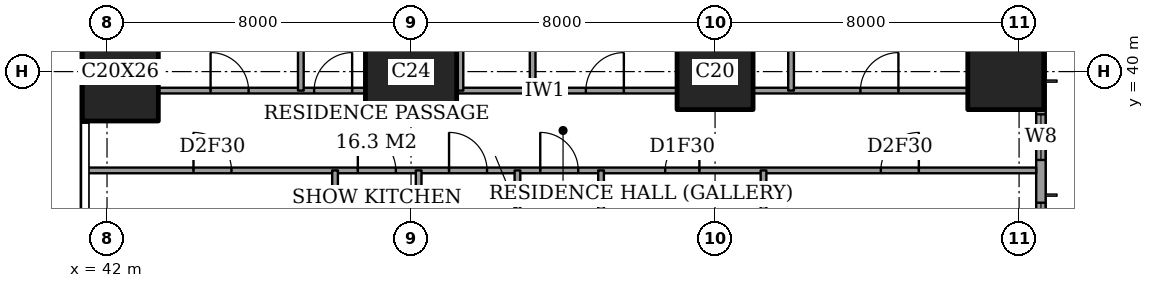
"""IFC4 building model, lengths in metres.
Left out: names, types, materials, properties, quantities, classifications, styles, units other than length and angle.
Written with IfcOpenShell. Run it as: python <this file> out.ifc"""

import sys

from ifc_helpers import new_model, si_unit, direction, frame, frame_2d, origin, origin_2d, place, context, subcontext, project, spatial, rectangle, extrude, element, fill, save


model = new_model("IFC4")
c1 = context("Model", 3, precision=1e-05, world=origin(), true_north=direction((0.0, 1.0)))
c2 = subcontext(c1, "Body", "Model", "MODEL_VIEW")
j1 = project(units=[si_unit("LENGTHUNIT", "METRE"), si_unit("PLANEANGLEUNIT", "RADIAN")], contexts=[c1])
p1 = place(None, origin())
s1 = spatial("IfcSite", under=j1, at=p1, CompositionType="ELEMENT")
p2 = place(p1, origin())
s2 = spatial("IfcBuilding", under=s1, at=p2, CompositionType="ELEMENT")
p3 = place(p2, frame((0.0, 0.0, 33.2)))
s3 = spatial("IfcBuildingStorey", under=s2, at=p3, CompositionType="ELEMENT", Elevation=33.2)
p4 = place(p3, frame((42.35, 40.0, 0.0), z_axis=(0.0, 0.0, 1.0), x_axis=(1.0, 0.0, 0.0)))
e1 = element("IfcColumn", 1, at=p4, inside=s3, PredefinedType="COLUMN", context=c2, shape_type="SweptSolid", body=[
    extrude(rectangle(XDim=2.0, YDim=2.6, at=origin_2d()), origin(), (0.0, 0.0, 1.0), 3.6),
])
p5 = place(p3, frame((50.0, 40.0, 0.0), z_axis=(0.0, 0.0, 1.0), x_axis=(1.0, 0.0, 0.0)))
e2 = element("IfcColumn", 2, at=p5, inside=s3, PredefinedType="COLUMN", context=c2, shape_type="SweptSolid", body=[
    extrude(rectangle(XDim=2.4, YDim=2.4, at=origin_2d()), origin(), (0.0, 0.0, 1.0), 3.6),
])
for number, where, z_axis, x_axis in (
    (3, (58.0, 40.0, 0.0), (0.0, 0.0, 1.0), (1.0, 0.0, 0.0)),
    (4, (65.65, 40.0, 0.0), (0.0, 0.0, 1.0), (1.0, 0.0, 0.0)),
):
    element("IfcColumn", number, at=place(p3, frame(where, z_axis=z_axis, x_axis=x_axis)), inside=s3, PredefinedType="COLUMN", context=c2, shape_type="SweptSolid", body=[
        extrude(rectangle(XDim=2.0, YDim=2.0, at=origin_2d()), origin(), (0.0, 0.0, 1.0), 3.6),
    ])
p6 = place(p3, frame((66.575, 3.175, 0.0), z_axis=(0.0, 0.0, 1.0), x_axis=(0.0, 1.0, 0.0)))
e5 = element("IfcWall", 5, at=p6, inside=s3, PredefinedType="SOLIDWALL", context=c2, shape_type="SweptSolid", body=[
    extrude(rectangle(XDim=41.65, YDim=0.25, at=frame_2d((20.825, 0.0))), origin(), (0.0, 0.0, 1.0), 3.6),
])
p7 = place(p6, frame((0.775, 0.0, 0.6)))
e6 = element("IfcOpeningElement", 6, at=p7, cuts=e5, PredefinedType="OPENING", context=c2, shape_type="SweptSolid", body=[
    extrude(rectangle(XDim=2.4, YDim=2.0, at=frame_2d((1.2, 1.0))), frame((0.0, 0.135, 0.0), z_axis=(0.0, -1.0, 0.0), x_axis=(1.0, 0.0, 0.0)), (0.0, 0.0, 1.0), 0.27),
])
p8 = place(p6, frame((6.1, 0.0, 0.6)))
e7 = element("IfcOpeningElement", 7, at=p8, cuts=e5, PredefinedType="OPENING", context=c2, shape_type="SweptSolid", body=[
    extrude(rectangle(XDim=1.2, YDim=2.0, at=frame_2d((0.6, 1.0))), frame((0.0, 0.135, 0.0), z_axis=(0.0, -1.0, 0.0), x_axis=(1.0, 0.0, 0.0)), (0.0, 0.0, 1.0), 0.27),
])
p9 = place(p6, frame((8.275, 0.0, 0.6)))
e8 = element("IfcOpeningElement", 8, at=p9, cuts=e5, PredefinedType="OPENING", context=c2, shape_type="SweptSolid", body=[
    extrude(rectangle(XDim=2.4, YDim=2.0, at=frame_2d((1.2, 1.0))), frame((0.0, 0.135, 0.0), z_axis=(0.0, -1.0, 0.0), x_axis=(1.0, 0.0, 0.0)), (0.0, 0.0, 1.0), 0.27),
])
p10 = place(p6, frame((15.775, 0.0, 0.6)))
e9 = element("IfcOpeningElement", 9, at=p10, cuts=e5, PredefinedType="OPENING", context=c2, shape_type="SweptSolid", body=[
    extrude(rectangle(XDim=2.4, YDim=2.0, at=frame_2d((1.2, 1.0))), frame((0.0, 0.135, 0.0), z_axis=(0.0, -1.0, 0.0), x_axis=(1.0, 0.0, 0.0)), (0.0, 0.0, 1.0), 0.27),
])
p11 = place(p6, frame((23.475, 0.0, 0.6)))
e10 = element("IfcOpeningElement", 10, at=p11, cuts=e5, PredefinedType="OPENING", context=c2, shape_type="SweptSolid", body=[
    extrude(rectangle(XDim=2.4, YDim=2.0, at=frame_2d((1.2, 1.0))), frame((0.0, 0.135, 0.0), z_axis=(0.0, -1.0, 0.0), x_axis=(1.0, 0.0, 0.0)), (0.0, 0.0, 1.0), 0.27),
])
p12 = place(p6, frame((30.975, 0.0, 0.6)))
e11 = element("IfcOpeningElement", 11, at=p12, cuts=e5, PredefinedType="OPENING", context=c2, shape_type="SweptSolid", body=[
    extrude(rectangle(XDim=2.4, YDim=2.0, at=frame_2d((1.2, 1.0))), frame((0.0, 0.135, 0.0), z_axis=(0.0, -1.0, 0.0), x_axis=(1.0, 0.0, 0.0)), (0.0, 0.0, 1.0), 0.27),
])
p13 = place(p6, frame((34.5, 0.0, 0.6)))
e12 = element("IfcOpeningElement", 12, at=p13, cuts=e5, PredefinedType="OPENING", context=c2, shape_type="SweptSolid", body=[
    extrude(rectangle(XDim=1.2, YDim=2.0, at=frame_2d((0.6, 1.0))), frame((0.0, 0.135, 0.0), z_axis=(0.0, -1.0, 0.0), x_axis=(1.0, 0.0, 0.0)), (0.0, 0.0, 1.0), 0.27),
])
p14 = place(p6, frame((38.475, 0.0, 0.6)))
e13 = element("IfcOpeningElement", 13, at=p14, cuts=e5, PredefinedType="OPENING", context=c2, shape_type="SweptSolid", body=[
    extrude(rectangle(XDim=2.4, YDim=2.0, at=frame_2d((1.2, 1.0))), frame((0.0, 0.135, 0.0), z_axis=(0.0, -1.0, 0.0), x_axis=(1.0, 0.0, 0.0)), (0.0, 0.0, 1.0), 0.27),
])
p15 = place(p3, frame((41.439, 37.4, 0.0), z_axis=(0.0, 0.0, 1.0), x_axis=(1.0, 0.0, 0.0)))
e14 = element("IfcWall", 14, at=p15, inside=s3, PredefinedType="PARTITIONING", context=c2, shape_type="SweptSolid", body=[
    extrude(rectangle(XDim=25.011, YDim=0.15, at=frame_2d((12.505, 0.0))), origin(), (0.0, 0.0, 1.0), 3.35),
])
p16 = place(p15, frame((11.961, 0.0, 0.0)))
e15 = element("IfcOpeningElement", 15, at=p16, cuts=e14, PredefinedType="OPENING", context=c2, shape_type="SweptSolid", body=[
    extrude(rectangle(XDim=1.0, YDim=2.1, at=frame_2d((0.5, 1.05))), frame((0.0, 0.085, 0.0), z_axis=(0.0, -1.0, 0.0), x_axis=(1.0, 0.0, 0.0)), (0.0, 0.0, 1.0), 0.17),
])
p17 = place(p15, frame((20.924, 0.0, 0.0)))
e16 = element("IfcOpeningElement", 16, at=p17, cuts=e14, PredefinedType="OPENING", context=c2, shape_type="SweptSolid", body=[
    extrude(rectangle(XDim=1.0, YDim=2.1, at=frame_2d((0.5, 1.05))), frame((0.0, 0.085, 0.0), z_axis=(0.0, -1.0, 0.0), x_axis=(1.0, 0.0, 0.0)), (0.0, 0.0, 1.0), 0.17),
])
p18 = place(p15, frame((15.249, 0.0, 0.0)))
e17 = element("IfcOpeningElement", 17, at=p18, cuts=e14, PredefinedType="OPENING", context=c2, shape_type="SweptSolid", body=[
    extrude(rectangle(XDim=0.9, YDim=2.1, at=frame_2d((0.45, 1.05))), frame((0.0, 0.085, 0.0), z_axis=(0.0, -1.0, 0.0), x_axis=(1.0, 0.0, 0.0)), (0.0, 0.0, 1.0), 0.17),
])
p19 = place(p15, frame((9.561, 0.0, 0.0)))
e18 = element("IfcOpeningElement", 18, at=p19, cuts=e14, PredefinedType="OPENING", context=c2, shape_type="SweptSolid", body=[
    extrude(rectangle(XDim=1.0, YDim=2.1, at=frame_2d((0.5, 1.05))), frame((0.0, 0.085, 0.0), z_axis=(0.0, -1.0, 0.0), x_axis=(1.0, 0.0, 0.0)), (0.0, 0.0, 1.0), 0.17),
])
p20 = place(p15, frame((7.161, 0.0, 0.0)))
e19 = element("IfcOpeningElement", 19, at=p20, cuts=e14, PredefinedType="OPENING", context=c2, shape_type="SweptSolid", body=[
    extrude(rectangle(XDim=1.0, YDim=2.1, at=frame_2d((0.5, 1.05))), frame((0.0, 0.085, 0.0), z_axis=(0.0, -1.0, 0.0), x_axis=(1.0, 0.0, 0.0)), (0.0, 0.0, 1.0), 0.17),
])
p21 = place(p15, frame((2.836, 0.0, 0.0)))
e20 = element("IfcOpeningElement", 20, at=p21, cuts=e14, PredefinedType="OPENING", context=c2, shape_type="SweptSolid", body=[
    extrude(rectangle(XDim=1.0, YDim=2.1, at=frame_2d((0.5, 1.05))), frame((0.0, 0.085, 0.0), z_axis=(0.0, -1.0, 0.0), x_axis=(1.0, 0.0, 0.0)), (0.0, 0.0, 1.0), 0.17),
])
p22 = place(p3, frame((43.35, 39.5, 0.0), z_axis=(0.0, 0.0, 1.0), x_axis=(1.0, 0.0, 0.0)))
e21 = element("IfcWall", 21, at=p22, inside=s3, PredefinedType="PARTITIONING", context=c2, shape_type="SweptSolid", body=[
    extrude(rectangle(XDim=5.45, YDim=0.15, at=frame_2d((2.725, 0.0))), origin(), (0.0, 0.0, 1.0), 3.35),
])
p23 = place(p22, frame((4.1, 0.0, 0.0)))
e22 = element("IfcOpeningElement", 22, at=p23, cuts=e21, PredefinedType="OPENING", context=c2, shape_type="SweptSolid", body=[
    extrude(rectangle(XDim=1.0, YDim=2.1, at=frame_2d((0.5, 1.05))), frame((0.0, 0.085, 0.0), z_axis=(0.0, -1.0, 0.0), x_axis=(1.0, 0.0, 0.0)), (0.0, 0.0, 1.0), 0.17),
])
p24 = place(p22, frame((1.375, 0.0, 0.0)))
e23 = element("IfcOpeningElement", 23, at=p24, cuts=e21, PredefinedType="OPENING", context=c2, shape_type="SweptSolid", body=[
    extrude(rectangle(XDim=1.0, YDim=2.1, at=frame_2d((0.5, 1.05))), frame((0.0, 0.085, 0.0), z_axis=(0.0, -1.0, 0.0), x_axis=(1.0, 0.0, 0.0)), (0.0, 0.0, 1.0), 0.17),
])
p25 = place(p3, frame((51.2, 39.5, 0.0), z_axis=(0.0, 0.0, 1.0), x_axis=(1.0, 0.0, 0.0)))
e24 = element("IfcWall", 24, at=p25, inside=s3, PredefinedType="PARTITIONING", context=c2, shape_type="SweptSolid", body=[
    extrude(rectangle(XDim=5.8, YDim=0.15, at=frame_2d((2.9, 0.0))), origin(), (0.0, 0.0, 1.0), 3.35),
])
p26 = place(p25, frame((3.4, 0.0, 0.0)))
e25 = element("IfcOpeningElement", 25, at=p26, cuts=e24, PredefinedType="OPENING", context=c2, shape_type="SweptSolid", body=[
    extrude(rectangle(XDim=1.0, YDim=2.1, at=frame_2d((0.5, 1.05))), frame((0.0, 0.085, 0.0), z_axis=(0.0, -1.0, 0.0), x_axis=(1.0, 0.0, 0.0)), (0.0, 0.0, 1.0), 0.17),
])
p27 = place(p3, frame((59.0, 39.5, 0.0), z_axis=(0.0, 0.0, 1.0), x_axis=(1.0, 0.0, 0.0)))
e26 = element("IfcWall", 26, at=p27, inside=s3, PredefinedType="PARTITIONING", context=c2, shape_type="SweptSolid", body=[
    extrude(rectangle(XDim=5.65, YDim=0.15, at=frame_2d((2.825, 0.0))), origin(), (0.0, 0.0, 1.0), 3.35),
])
p28 = place(p27, frame((2.825, 0.0, 0.0)))
e27 = element("IfcOpeningElement", 27, at=p28, cuts=e26, PredefinedType="OPENING", context=c2, shape_type="SweptSolid", body=[
    extrude(rectangle(XDim=1.0, YDim=2.1, at=frame_2d((0.5, 1.05))), frame((0.0, 0.085, 0.0), z_axis=(0.0, -1.0, 0.0), x_axis=(1.0, 0.0, 0.0)), (0.0, 0.0, 1.0), 0.17),
])
p29 = place(p3, frame((47.1, 39.5, 0.0), z_axis=(0.0, 0.0, 1.0), x_axis=(0.0, 1.0, 0.0)))
e28 = element("IfcWall", 28, at=p29, inside=s3, PredefinedType="PARTITIONING", context=c2, shape_type="SweptSolid", body=[
    extrude(rectangle(XDim=8.95, YDim=0.15, at=frame_2d((4.475, 0.0))), origin(), (0.0, 0.0, 1.0), 3.35),
])
p30 = place(p3, frame((48.0, 28.0, 0.0), z_axis=(0.0, 0.0, 1.0), x_axis=(0.0, 1.0, 0.0)))
e29 = element("IfcWall", 29, at=p30, inside=s3, PredefinedType="PARTITIONING", context=c2, shape_type="SweptSolid", body=[
    extrude(rectangle(XDim=9.4, YDim=0.15, at=frame_2d((4.7, 0.0))), origin(), (0.0, 0.0, 1.0), 3.35),
])
p31 = place(p30, frame((0.5, 0.0, 0.0)))
e30 = element("IfcOpeningElement", 30, at=p31, cuts=e29, PredefinedType="OPENING", context=c2, shape_type="SweptSolid", body=[
    extrude(rectangle(XDim=1.0, YDim=2.1, at=frame_2d((0.5, 1.05))), frame((0.0, 0.085, 0.0), z_axis=(0.0, -1.0, 0.0), x_axis=(1.0, 0.0, 0.0)), (0.0, 0.0, 1.0), 0.17),
])
p32 = place(p3, frame((50.2, 33.2, 0.0), z_axis=(0.0, 0.0, 1.0), x_axis=(0.0, 1.0, 0.0)))
e31 = element("IfcWall", 31, at=p32, inside=s3, PredefinedType="PARTITIONING", context=c2, shape_type="SweptSolid", body=[
    extrude(rectangle(XDim=4.2, YDim=0.15, at=frame_2d((2.1, 0.0))), origin(), (0.0, 0.0, 1.0), 3.35),
])
p33 = place(p3, frame((51.3, 39.5, 0.0), z_axis=(0.0, 0.0, 1.0), x_axis=(0.0, 1.0, 0.0)))
e32 = element("IfcWall", 32, at=p33, inside=s3, PredefinedType="PARTITIONING", context=c2, shape_type="SweptSolid", body=[
    extrude(rectangle(XDim=8.95, YDim=0.15, at=frame_2d((4.475, 0.0))), origin(), (0.0, 0.0, 1.0), 3.35),
])
p34 = place(p33, frame((4.025, 0.0, 0.0)))
e33 = element("IfcOpeningElement", 33, at=p34, cuts=e32, PredefinedType="OPENING", context=c2, shape_type="SweptSolid", body=[
    extrude(rectangle(XDim=0.9, YDim=2.1, at=frame_2d((0.45, 1.05))), frame((0.0, 0.085, 0.0), z_axis=(0.0, -1.0, 0.0), x_axis=(1.0, 0.0, 0.0)), (0.0, 0.0, 1.0), 0.17),
])
p35 = place(p3, frame((52.8, 30.0, 0.0), z_axis=(0.0, 0.0, 1.0), x_axis=(0.0, 1.0, 0.0)))
e34 = element("IfcWall", 34, at=p35, inside=s3, PredefinedType="PARTITIONING", context=c2, shape_type="SweptSolid", body=[
    extrude(rectangle(XDim=7.4, YDim=0.15, at=frame_2d((3.7, 0.0))), origin(), (0.0, 0.0, 1.0), 3.35),
])
p36 = place(p3, frame((53.2, 39.5, 0.0), z_axis=(0.0, 0.0, 1.0), x_axis=(0.0, 1.0, 0.0)))
e35 = element("IfcWall", 35, at=p36, inside=s3, PredefinedType="PARTITIONING", context=c2, shape_type="SweptSolid", body=[
    extrude(rectangle(XDim=8.95, YDim=0.15, at=frame_2d((4.475, 0.0))), origin(), (0.0, 0.0, 1.0), 3.35),
])
p37 = place(p3, frame((55.0, 28.0, 0.0), z_axis=(0.0, 0.0, 1.0), x_axis=(0.0, 1.0, 0.0)))
e36 = element("IfcWall", 36, at=p37, inside=s3, PredefinedType="PARTITIONING", context=c2, shape_type="SweptSolid", body=[
    extrude(rectangle(XDim=9.4, YDim=0.15, at=frame_2d((4.7, 0.0))), origin(), (0.0, 0.0, 1.0), 3.35),
])
p38 = place(p37, frame((0.5, 0.0, 0.0)))
e37 = element("IfcOpeningElement", 37, at=p38, cuts=e36, PredefinedType="OPENING", context=c2, shape_type="SweptSolid", body=[
    extrude(rectangle(XDim=1.0, YDim=2.1, at=frame_2d((0.5, 1.05))), frame((0.0, 0.085, 0.0), z_axis=(0.0, -1.0, 0.0), x_axis=(1.0, 0.0, 0.0)), (0.0, 0.0, 1.0), 0.17),
])
p39 = place(p3, frame((59.275, 33.2, 0.0), z_axis=(0.0, 0.0, 1.0), x_axis=(0.0, 1.0, 0.0)))
e38 = element("IfcWall", 38, at=p39, inside=s3, PredefinedType="PARTITIONING", context=c2, shape_type="SweptSolid", body=[
    extrude(rectangle(XDim=4.2, YDim=0.15, at=frame_2d((2.1, 0.0))), origin(), (0.0, 0.0, 1.0), 3.35),
])
p40 = place(p3, frame((60.0, 39.5, 0.0), z_axis=(0.0, 0.0, 1.0), x_axis=(0.0, 1.0, 0.0)))
e39 = element("IfcWall", 39, at=p40, inside=s3, PredefinedType="PARTITIONING", context=c2, shape_type="SweptSolid", body=[
    extrude(rectangle(XDim=8.95, YDim=0.15, at=frame_2d((4.475, 0.0))), origin(), (0.0, 0.0, 1.0), 3.35),
])
p41 = place(p12, origin())
e40 = element("IfcWindow", 40, at=p41, inside=s3, PartitioningType="SINGLE_PANEL", PredefinedType="WINDOW", context=c2, shape_type="SweptSolid", body=[
    extrude(rectangle(XDim=2.4, YDim=2.0, at=frame_2d((1.2, 1.0))), frame((0.0, 0.03, 0.0), z_axis=(0.0, -1.0, 0.0), x_axis=(1.0, 0.0, 0.0)), (0.0, 0.0, 1.0), 0.06),
])
fill(e11, e40)
p42 = place(p13, origin())
e41 = element("IfcWindow", 41, at=p42, inside=s3, PartitioningType="SINGLE_PANEL", PredefinedType="WINDOW", context=c2, shape_type="SweptSolid", body=[
    extrude(rectangle(XDim=1.2, YDim=2.0, at=frame_2d((0.6, 1.0))), frame((0.0, 0.03, 0.0), z_axis=(0.0, -1.0, 0.0), x_axis=(1.0, 0.0, 0.0)), (0.0, 0.0, 1.0), 0.06),
])
fill(e12, e41)
p43 = place(p28, origin())
e42 = element("IfcDoor", 42, at=p43, inside=s3, OperationType="SINGLE_SWING_LEFT", PredefinedType="DOOR", context=c2, shape_type="SweptSolid", body=[
    extrude(rectangle(XDim=1.0, YDim=2.1, at=frame_2d((0.5, 1.05))), frame((0.0, 0.025, 0.0), z_axis=(0.0, -1.0, 0.0), x_axis=(1.0, 0.0, 0.0)), (0.0, 0.0, 1.0), 0.05),
])
fill(e27, e42)
p44 = place(p26, origin())
e43 = element("IfcDoor", 43, at=p44, inside=s3, OperationType="SINGLE_SWING_LEFT", PredefinedType="DOOR", context=c2, shape_type="SweptSolid", body=[
    extrude(rectangle(XDim=1.0, YDim=2.1, at=frame_2d((0.5, 1.05))), frame((0.0, 0.025, 0.0), z_axis=(0.0, -1.0, 0.0), x_axis=(1.0, 0.0, 0.0)), (0.0, 0.0, 1.0), 0.05),
])
fill(e25, e43)
p45 = place(p23, origin())
e44 = element("IfcDoor", 44, at=p45, inside=s3, OperationType="SINGLE_SWING_LEFT", PredefinedType="DOOR", context=c2, shape_type="SweptSolid", body=[
    extrude(rectangle(XDim=1.0, YDim=2.1, at=frame_2d((0.5, 1.05))), frame((0.0, 0.025, 0.0), z_axis=(0.0, -1.0, 0.0), x_axis=(1.0, 0.0, 0.0)), (0.0, 0.0, 1.0), 0.05),
])
fill(e22, e44)
p46 = place(p24, origin())
e45 = element("IfcDoor", 45, at=p46, inside=s3, OperationType="SINGLE_SWING_RIGHT", PredefinedType="DOOR", context=c2, shape_type="SweptSolid", body=[
    extrude(rectangle(XDim=1.0, YDim=2.1, at=frame_2d((0.5, 1.05))), frame((0.0, 0.025, 0.0), z_axis=(0.0, -1.0, 0.0), x_axis=(1.0, 0.0, 0.0)), (0.0, 0.0, 1.0), 0.05),
])
fill(e23, e45)
p47 = place(p16, origin())
e46 = element("IfcDoor", 46, at=p47, inside=s3, OperationType="SINGLE_SWING_RIGHT", PredefinedType="DOOR", context=c2, shape_type="SweptSolid", body=[
    extrude(rectangle(XDim=1.0, YDim=2.1, at=frame_2d((0.5, 1.05))), frame((0.0, 0.025, 0.0), z_axis=(0.0, -1.0, 0.0), x_axis=(1.0, 0.0, 0.0)), (0.0, 0.0, 1.0), 0.05),
])
fill(e15, e46)
p48 = place(p17, origin())
e47 = element("IfcDoor", 47, at=p48, inside=s3, OperationType="SINGLE_SWING_LEFT", PredefinedType="DOOR", context=c2, shape_type="SweptSolid", body=[
    extrude(rectangle(XDim=1.0, YDim=2.1, at=frame_2d((0.5, 1.05))), frame((0.0, 0.025, 0.0), z_axis=(0.0, -1.0, 0.0), x_axis=(1.0, 0.0, 0.0)), (0.0, 0.0, 1.0), 0.05),
])
fill(e16, e47)
p49 = place(p18, origin())
e48 = element("IfcDoor", 48, at=p49, inside=s3, OperationType="SINGLE_SWING_LEFT", PredefinedType="DOOR", context=c2, shape_type="SweptSolid", body=[
    extrude(rectangle(XDim=0.9, YDim=2.1, at=frame_2d((0.45, 1.05))), frame((0.0, 0.025, 0.0), z_axis=(0.0, -1.0, 0.0), x_axis=(1.0, 0.0, 0.0)), (0.0, 0.0, 1.0), 0.05),
])
fill(e17, e48)
p50 = place(p19, origin())
e49 = element("IfcDoor", 49, at=p50, inside=s3, OperationType="SINGLE_SWING_RIGHT", PredefinedType="DOOR", context=c2, shape_type="SweptSolid", body=[
    extrude(rectangle(XDim=1.0, YDim=2.1, at=frame_2d((0.5, 1.05))), frame((0.0, 0.025, 0.0), z_axis=(0.0, -1.0, 0.0), x_axis=(1.0, 0.0, 0.0)), (0.0, 0.0, 1.0), 0.05),
])
fill(e18, e49)
p51 = place(p20, origin())
e50 = element("IfcDoor", 50, at=p51, inside=s3, OperationType="SINGLE_SWING_RIGHT", PredefinedType="DOOR", context=c2, shape_type="SweptSolid", body=[
    extrude(rectangle(XDim=1.0, YDim=2.1, at=frame_2d((0.5, 1.05))), frame((0.0, 0.025, 0.0), z_axis=(0.0, -1.0, 0.0), x_axis=(1.0, 0.0, 0.0)), (0.0, 0.0, 1.0), 0.05),
])
fill(e19, e50)
p52 = place(p21, origin())
e51 = element("IfcDoor", 51, at=p52, inside=s3, OperationType="SINGLE_SWING_RIGHT", PredefinedType="DOOR", context=c2, shape_type="SweptSolid", body=[
    extrude(rectangle(XDim=1.0, YDim=2.1, at=frame_2d((0.5, 1.05))), frame((0.0, 0.025, 0.0), z_axis=(0.0, -1.0, 0.0), x_axis=(1.0, 0.0, 0.0)), (0.0, 0.0, 1.0), 0.05),
])
fill(e20, e51)
save(model, sys.argv[1])
